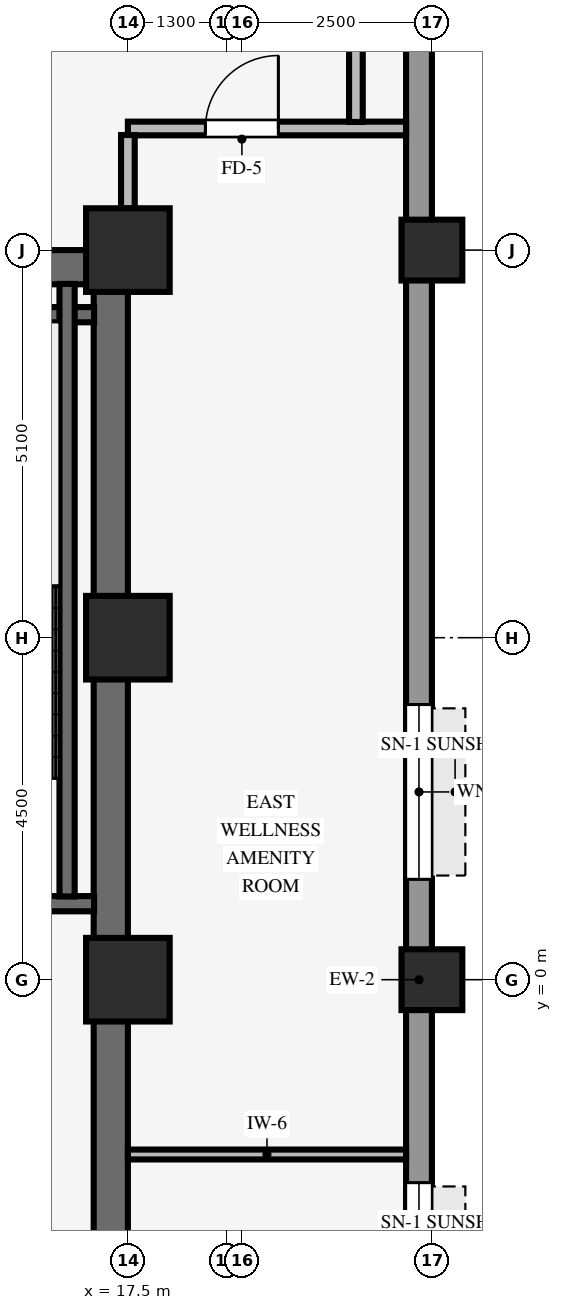
"""IFC4 building model, lengths in metres.
Left out: names, types, materials, properties, quantities, classifications, styles, units other than length and angle.
Written with IfcOpenShell. Run it as: python <this file> out.ifc"""

import sys

from ifc_helpers import new_model, si_unit, direction, frame, frame_2d, origin, origin_2d, place, context, subcontext, project, spatial, rectangle, hollow_rectangle, extrude, source, transform, mapped, element, fill, save


model = new_model("IFC4")
c1 = context("Model", 3, precision=1e-05, world=origin(), true_north=direction((0.0, 1.0)))
c2 = subcontext(c1, "Body", "Model", "MODEL_VIEW")
j1 = project(units=[si_unit("LENGTHUNIT", "METRE"), si_unit("PLANEANGLEUNIT", "RADIAN")], contexts=[c1])
p1 = place(None, origin())
s1 = spatial("IfcSite", under=j1, at=p1, CompositionType="ELEMENT")
p2 = place(p1, origin())
s2 = spatial("IfcBuilding", under=s1, at=p2, CompositionType="ELEMENT")
p3 = place(p2, frame((0.0, 0.0, 82.35)))
s3 = spatial("IfcBuildingStorey", under=s2, at=p3, CompositionType="ELEMENT", Elevation=82.35)
p4 = place(p3, frame((9.0, 9.375, 0.0), z_axis=(0.0, 0.0, 1.0), x_axis=(1.0, 0.0, 0.0)))
e1 = element("IfcWall", 1, at=p4, inside=s3, PredefinedType="SHEAR", context=c2, shape_type="SweptSolid", body=[
    extrude(rectangle(XDim=8.5, YDim=0.45, at=frame_2d((4.25, 0.0))), origin(), (0.0, 0.0, 1.0), 3.25),
])
p5 = place(p3, frame((17.275, -9.155, 0.0), z_axis=(0.0, 0.0, 1.0), x_axis=(0.0, 1.0, 0.0)))
e2 = element("IfcWall", 2, at=p5, inside=s3, PredefinedType="SHEAR", context=c2, shape_type="SweptSolid", body=[
    extrude(rectangle(XDim=18.31, YDim=0.45, at=frame_2d((9.155, 0.0))), origin(), (0.0, 0.0, 1.0), 3.25),
])
for number, where, z_axis, x_axis in (
    (3, (17.5, 4.5, 0.0), (0.0, 0.0, 1.0), (1.0, 0.0, 0.0)),
    (4, (17.5, 9.6, 0.0), (0.0, 0.0, 1.0), (1.0, 0.0, 0.0)),
    (5, (17.5, 0.0, 0.0), (0.0, 0.0, 1.0), (1.0, 0.0, 0.0)),
):
    element("IfcColumn", number, at=place(p3, frame(where, z_axis=z_axis, x_axis=x_axis)), inside=s3, PredefinedType="COLUMN", context=c2, shape_type="SweptSolid", body=[
        extrude(rectangle(XDim=1.1, YDim=1.1, at=origin_2d()), origin(), (0.0, 0.0, 1.0), 3.25),
    ])
for number, where, z_axis, x_axis in (
    (6, (21.5, 0.0, 0.0), (0.0, 0.0, 1.0), (1.0, 0.0, 0.0)),
    (7, (21.5, 9.6, 0.0), (0.0, 0.0, 1.0), (1.0, 0.0, 0.0)),
):
    element("IfcColumn", number, at=place(p3, frame(where, z_axis=z_axis, x_axis=x_axis)), inside=s3, PredefinedType="COLUMN", context=c2, shape_type="SweptSolid", body=[
        extrude(hollow_rectangle(XDim=0.8, YDim=0.8, WallThickness=0.055, InnerFilletRadius=0.055, OuterFilletRadius=0.11, at=origin_2d()), origin(), (0.0, 0.0, 1.0), 3.25),
    ])
p6 = place(p3, frame((21.33, -20.764, 0.0), z_axis=(0.0, 0.0, 1.0), x_axis=(0.0, 1.0, 0.0)))
e8 = element("IfcWall", 8, at=p6, inside=s3, PredefinedType="STANDARD", context=c2, shape_type="SweptSolid", body=[
    extrude(rectangle(XDim=41.528, YDim=0.34, at=frame_2d((20.764, 0.0))), origin(), (0.0, 0.0, 1.0), 3.24),
])
p7 = place(p6, frame((15.793, 0.0, 0.8)))
e9 = element("IfcOpeningElement", 9, at=p7, cuts=e8, PredefinedType="OPENING", context=c2, shape_type="SweptSolid", body=[
    extrude(rectangle(XDim=2.3, YDim=1.62, at=frame_2d((1.15, 0.81))), frame((0.0, 0.18, 0.0), z_axis=(0.0, -1.0, 0.0), x_axis=(1.0, 0.0, 0.0)), (0.0, 0.0, 1.0), 0.36),
])
p8 = place(p6, frame((22.084, 0.0, 0.8)))
e10 = element("IfcOpeningElement", 10, at=p8, cuts=e8, PredefinedType="OPENING", context=c2, shape_type="SweptSolid", body=[
    extrude(rectangle(XDim=2.3, YDim=1.62, at=frame_2d((1.15, 0.81))), frame((0.0, 0.18, 0.0), z_axis=(0.0, -1.0, 0.0), x_axis=(1.0, 0.0, 0.0)), (0.0, 0.0, 1.0), 0.36),
])
for number, where, z_axis, x_axis in (
    (11, (13.535, 1.0, 0.0), (0.0, 0.0, 1.0), (1.0, 0.0, 0.0)),
    (12, (13.535, 8.75, 0.0), (0.0, 0.0, 1.0), (1.0, 0.0, 0.0)),
):
    element("IfcWall", number, at=place(p3, frame(where, z_axis=z_axis, x_axis=x_axis)), inside=s3, PredefinedType="SHEAR", context=c2, shape_type="SweptSolid", body=[
        extrude(rectangle(XDim=3.52, YDim=0.2, at=frame_2d((1.76, 0.0))), origin(), (0.0, 0.0, 1.0), 3.25),
    ])
p9 = place(p3, frame((16.7, 1.095, 0.0), z_axis=(0.0, 0.0, 1.0), x_axis=(0.0, 1.0, 0.0)))
e13 = element("IfcWall", 13, at=p9, inside=s3, PredefinedType="SHEAR", context=c2, shape_type="SweptSolid", body=[
    extrude(rectangle(XDim=8.06, YDim=0.2, at=frame_2d((4.03, 0.0))), origin(), (0.0, 0.0, 1.0), 3.25),
])
p10 = place(p3, frame((17.5, -2.3, 0.0), z_axis=(0.0, 0.0, 1.0), x_axis=(1.0, 0.0, 0.0)))
e14 = element("IfcWall", 14, at=p10, inside=s3, PredefinedType="PARTITIONING", context=c2, shape_type="SweptSolid", body=[
    extrude(rectangle(XDim=3.66, YDim=0.13, at=frame_2d((1.83, 0.0))), origin(), (0.0, 0.0, 1.0), 3.24),
])
p11 = place(p3, frame((17.5, 11.2, 0.0), z_axis=(0.0, 0.0, 1.0), x_axis=(1.0, 0.0, 0.0)))
e15 = element("IfcWall", 15, at=p11, inside=s3, PredefinedType="PARTITIONING", context=c2, shape_type="SweptSolid", body=[
    extrude(rectangle(XDim=3.66, YDim=0.18, at=frame_2d((1.83, 0.0))), origin(), (0.0, 0.0, 1.0), 3.24),
])
p12 = place(p11, frame((1.02, 0.0, 0.0)))
e16 = element("IfcOpeningElement", 16, at=p12, cuts=e15, PredefinedType="OPENING", context=c2, shape_type="SweptSolid", body=[
    extrude(rectangle(XDim=0.96, YDim=2.1, at=frame_2d((0.48, 1.05))), frame((0.0, 0.1, 0.0), z_axis=(0.0, -1.0, 0.0), x_axis=(1.0, 0.0, 0.0)), (0.0, 0.0, 1.0), 0.2),
])
p13 = place(p3, frame((17.5, 10.146, 0.0), z_axis=(0.0, 0.0, 1.0), x_axis=(0.0, 1.0, 0.0)))
e17 = element("IfcWall", 17, at=p13, inside=s3, PredefinedType="PARTITIONING", context=c2, shape_type="SweptSolid", body=[
    extrude(rectangle(XDim=0.968, YDim=0.18, at=frame_2d((0.484, 0.0))), origin(), (0.0, 0.0, 1.0), 2.618),
])
p14 = place(p3, frame((20.5, 11.286, 0.0), z_axis=(0.0, 0.0, 1.0), x_axis=(0.0, 1.0, 0.0)))
e18 = element("IfcWall", 18, at=p14, inside=s3, PredefinedType="PARTITIONING", context=c2, shape_type="SweptSolid", body=[
    extrude(rectangle(XDim=2.228, YDim=0.18, at=frame_2d((1.114, 0.0))), origin(), (0.0, 0.0, 1.0), 3.24),
])
m1 = source(origin(), c2, "Body", "SweptSolid", [
    extrude(rectangle(XDim=2.3, YDim=1.62, at=frame_2d((1.15, 0.81))), frame((0.0, 0.03, 0.0), z_axis=(0.0, -1.0, 0.0), x_axis=(1.0, 0.0, 0.0)), (0.0, 0.0, 1.0), 0.06),
])
p15 = place(p7, origin())
e19 = element("IfcWindow", 19, at=p15, inside=s3, PartitioningType="SINGLE_PANEL", PredefinedType="WINDOW", context=c2, shape_type="MappedRepresentation", body=[
    mapped(m1, transform((0.0, 0.0, 0.0), scale=1.0)),
])
fill(e9, e19)
p16 = place(p8, origin())
e20 = element("IfcWindow", 20, at=p16, inside=s3, PartitioningType="SINGLE_PANEL", PredefinedType="WINDOW", context=c2, shape_type="MappedRepresentation", body=[
    mapped(m1, transform((0.0, 0.0, 0.0), scale=1.0)),
])
fill(e10, e20)
m2 = source(origin(), c2, "Body", "SweptSolid", [
    extrude(rectangle(XDim=0.96, YDim=2.1, at=frame_2d((0.48, 1.05))), frame((0.0, 0.025, 0.0), z_axis=(0.0, -1.0, 0.0), x_axis=(1.0, 0.0, 0.0)), (0.0, 0.0, 1.0), 0.05),
])
p17 = place(p12, origin())
e21 = element("IfcDoor", 21, at=p17, inside=s3, OperationType="SINGLE_SWING_RIGHT", PredefinedType="DOOR", context=c2, shape_type="MappedRepresentation", body=[
    mapped(m2, transform((0.0, 0.0, 0.0), scale=1.0)),
])
fill(e16, e21)
save(model, sys.argv[1])
